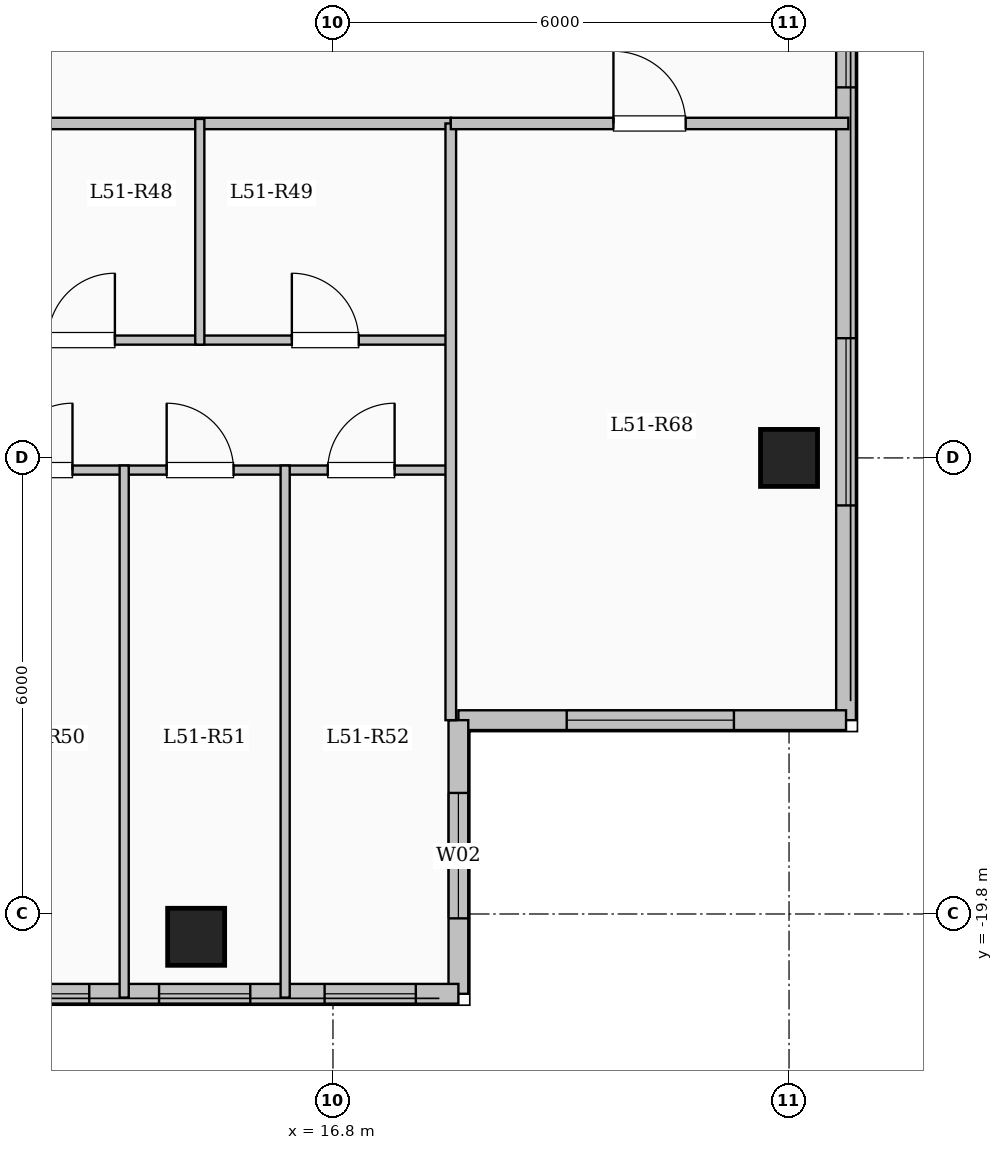
"""IFC4 building model, lengths in metres.
Left out: names, types, materials, properties, quantities, classifications, styles, units other than length and angle.
Written with IfcOpenShell. Run it as: python <this file> out.ifc"""

import sys

from ifc_helpers import new_model, si_unit, direction, frame, frame_2d, origin, origin_2d, place, context, subcontext, project, spatial, rectangle, extrude, element, fill, save


model = new_model("IFC4")
c1 = context("Model", 3, precision=1e-05, world=origin(), true_north=direction((0.0, 1.0)))
c2 = subcontext(c1, "Body", "Model", "MODEL_VIEW")
j1 = project(units=[si_unit("LENGTHUNIT", "METRE"), si_unit("PLANEANGLEUNIT", "RADIAN")], contexts=[c1])
p1 = place(None, origin())
s1 = spatial("IfcSite", under=j1, at=p1, CompositionType="ELEMENT")
p2 = place(p1, origin())
s2 = spatial("IfcBuilding", under=s1, at=p2, CompositionType="ELEMENT")
p3 = place(p2, frame((0.0, 0.0, 190.25)))
s3 = spatial("IfcBuildingStorey", under=s2, at=p3, CompositionType="ELEMENT", Elevation=190.25)
for number, where, z_axis, x_axis in (
    (1, (15.0, -20.1, 0.0), (0.0, 0.0, 1.0), (1.0, 0.0, 0.0)),
    (2, (22.8, -13.8, 0.0), (0.0, 0.0, 1.0), (1.0, 0.0, 0.0)),
):
    element("IfcColumn", number, at=place(p3, frame(where, z_axis=z_axis, x_axis=x_axis)), inside=s3, PredefinedType="COLUMN", context=c2, shape_type="SweptSolid", body=[
        extrude(rectangle(XDim=0.75, YDim=0.75, at=origin_2d()), origin(), (0.0, 0.0, 1.0), 3.35),
    ])
p4 = place(p3, frame((23.55, 17.25, 0.0), z_axis=(0.0, 0.0, 1.0), x_axis=(0.0, -1.0, 0.0)))
e3 = element("IfcWall", 3, at=p4, inside=s3, PredefinedType="SOLIDWALL", context=c2, shape_type="SweptSolid", body=[
    extrude(rectangle(XDim=34.5, YDim=0.26, at=frame_2d((17.25, 0.0))), origin(), (0.0, 0.0, 1.0), 3.1),
])
p5 = place(p4, frame((1.375, 0.0, 0.9)))
e4 = element("IfcOpeningElement", 4, at=p5, cuts=e3, PredefinedType="OPENING", context=c2, shape_type="SweptSolid", body=[
    extrude(rectangle(XDim=2.0, YDim=1.7, at=frame_2d((1.0, 0.85))), frame((0.0, 0.14, 0.0), z_axis=(0.0, -1.0, 0.0), x_axis=(1.0, 0.0, 0.0)), (0.0, 0.0, 1.0), 0.28),
])
p6 = place(p4, frame((5.125, 0.0, 0.95)))
e5 = element("IfcOpeningElement", 5, at=p6, cuts=e3, PredefinedType="OPENING", context=c2, shape_type="SweptSolid", body=[
    extrude(rectangle(XDim=1.0, YDim=1.5, at=frame_2d((0.5, 0.75))), frame((0.0, 0.14, 0.0), z_axis=(0.0, -1.0, 0.0), x_axis=(1.0, 0.0, 0.0)), (0.0, 0.0, 1.0), 0.28),
])
p7 = place(p4, frame((14.5, 0.0, 0.9)))
e6 = element("IfcOpeningElement", 6, at=p7, cuts=e3, PredefinedType="OPENING", context=c2, shape_type="SweptSolid", body=[
    extrude(rectangle(XDim=2.0, YDim=1.7, at=frame_2d((1.0, 0.85))), frame((0.0, 0.14, 0.0), z_axis=(0.0, -1.0, 0.0), x_axis=(1.0, 0.0, 0.0)), (0.0, 0.0, 1.0), 0.28),
])
p8 = place(p4, frame((24.975, 0.0, 0.95)))
e7 = element("IfcOpeningElement", 7, at=p8, cuts=e3, PredefinedType="OPENING", context=c2, shape_type="SweptSolid", body=[
    extrude(rectangle(XDim=1.2, YDim=1.5, at=frame_2d((0.6, 0.75))), frame((0.0, 0.14, 0.0), z_axis=(0.0, -1.0, 0.0), x_axis=(1.0, 0.0, 0.0)), (0.0, 0.0, 1.0), 0.28),
])
p9 = place(p4, frame((29.475, 0.0, 0.9)))
e8 = element("IfcOpeningElement", 8, at=p9, cuts=e3, PredefinedType="OPENING", context=c2, shape_type="SweptSolid", body=[
    extrude(rectangle(XDim=2.2, YDim=1.75, at=frame_2d((1.1, 0.875))), frame((0.0, 0.14, 0.0), z_axis=(0.0, -1.0, 0.0), x_axis=(1.0, 0.0, 0.0)), (0.0, 0.0, 1.0), 0.28),
])
p10 = place(p3, frame((23.55, -17.25, 0.0), z_axis=(0.0, 0.0, 1.0), x_axis=(-1.0, 0.0, 0.0)))
e9 = element("IfcWall", 9, at=p10, inside=s3, PredefinedType="SOLIDWALL", context=c2, shape_type="SweptSolid", body=[
    extrude(rectangle(XDim=5.1, YDim=0.26, at=frame_2d((2.55, 0.0))), origin(), (0.0, 0.0, 1.0), 3.1),
])
p11 = place(p10, frame((1.475, 0.0, 0.9)))
e10 = element("IfcOpeningElement", 10, at=p11, cuts=e9, PredefinedType="OPENING", context=c2, shape_type="SweptSolid", body=[
    extrude(rectangle(XDim=2.2, YDim=1.75, at=frame_2d((1.1, 0.875))), frame((0.0, 0.14, 0.0), z_axis=(0.0, -1.0, 0.0), x_axis=(1.0, 0.0, 0.0)), (0.0, 0.0, 1.0), 0.28),
])
p12 = place(p3, frame((18.45, -17.25, 0.0), z_axis=(0.0, 0.0, 1.0), x_axis=(0.0, -1.0, 0.0)))
e11 = element("IfcWall", 11, at=p12, inside=s3, PredefinedType="SOLIDWALL", context=c2, shape_type="SweptSolid", body=[
    extrude(rectangle(XDim=3.6, YDim=0.26, at=frame_2d((1.8, 0.0))), origin(), (0.0, 0.0, 1.0), 3.1),
])
p13 = place(p12, frame((0.958, 0.0, 0.9)))
e12 = element("IfcOpeningElement", 12, at=p13, cuts=e11, PredefinedType="OPENING", context=c2, shape_type="SweptSolid", body=[
    extrude(rectangle(XDim=1.65, YDim=1.6, at=frame_2d((0.825, 0.8))), frame((0.0, 0.14, 0.0), z_axis=(0.0, -1.0, 0.0), x_axis=(1.0, 0.0, 0.0)), (0.0, 0.0, 1.0), 0.28),
])
p14 = place(p3, frame((18.45, -20.85, 0.0), z_axis=(0.0, 0.0, 1.0), x_axis=(-1.0, 0.0, 0.0)))
e13 = element("IfcWall", 13, at=p14, inside=s3, PredefinedType="SOLIDWALL", context=c2, shape_type="SweptSolid", body=[
    extrude(rectangle(XDim=11.1, YDim=0.26, at=frame_2d((5.55, 0.0))), origin(), (0.0, 0.0, 1.0), 3.1),
])
p15 = place(p14, frame((0.56, 0.0, 0.95)))
e14 = element("IfcOpeningElement", 14, at=p15, cuts=e13, PredefinedType="OPENING", context=c2, shape_type="SweptSolid", body=[
    extrude(rectangle(XDim=1.2, YDim=1.5, at=frame_2d((0.6, 0.75))), frame((0.0, 0.14, 0.0), z_axis=(0.0, -1.0, 0.0), x_axis=(1.0, 0.0, 0.0)), (0.0, 0.0, 1.0), 0.28),
])
p16 = place(p14, frame((2.738, 0.0, 0.95)))
e15 = element("IfcOpeningElement", 15, at=p16, cuts=e13, PredefinedType="OPENING", context=c2, shape_type="SweptSolid", body=[
    extrude(rectangle(XDim=1.2, YDim=1.5, at=frame_2d((0.6, 0.75))), frame((0.0, 0.14, 0.0), z_axis=(0.0, -1.0, 0.0), x_axis=(1.0, 0.0, 0.0)), (0.0, 0.0, 1.0), 0.28),
])
p17 = place(p14, frame((4.856, 0.0, 0.95)))
e16 = element("IfcOpeningElement", 16, at=p17, cuts=e13, PredefinedType="OPENING", context=c2, shape_type="SweptSolid", body=[
    extrude(rectangle(XDim=1.2, YDim=1.5, at=frame_2d((0.6, 0.75))), frame((0.0, 0.14, 0.0), z_axis=(0.0, -1.0, 0.0), x_axis=(1.0, 0.0, 0.0)), (0.0, 0.0, 1.0), 0.28),
])
p18 = place(p14, frame((7.362, 0.0, 0.9)))
e17 = element("IfcOpeningElement", 17, at=p18, cuts=e13, PredefinedType="OPENING", context=c2, shape_type="SweptSolid", body=[
    extrude(rectangle(XDim=1.65, YDim=1.6, at=frame_2d((0.825, 0.8))), frame((0.0, 0.14, 0.0), z_axis=(0.0, -1.0, 0.0), x_axis=(1.0, 0.0, 0.0)), (0.0, 0.0, 1.0), 0.28),
])
p19 = place(p14, frame((10.103, 0.0, 0.95)))
e18 = element("IfcOpeningElement", 18, at=p19, cuts=e13, PredefinedType="OPENING", context=c2, shape_type="SweptSolid", body=[
    extrude(rectangle(XDim=0.85, YDim=1.5, at=frame_2d((0.425, 0.75))), frame((0.0, 0.14, 0.0), z_axis=(0.0, -1.0, 0.0), x_axis=(1.0, 0.0, 0.0)), (0.0, 0.0, 1.0), 0.28),
])
p20 = place(p3, frame((8.55, -9.4, 0.0), z_axis=(0.0, 0.0, 1.0), x_axis=(1.0, 0.0, 0.0)))
e19 = element("IfcWall", 19, at=p20, inside=s3, PredefinedType="PARTITIONING", context=c2, shape_type="SweptSolid", body=[
    extrude(rectangle(XDim=9.8, YDim=0.15, at=frame_2d((4.9, 0.0))), origin(), (0.0, 0.0, 1.0), 3.1),
])
p21 = place(p20, frame((0.9, 0.0, 0.0)))
e20 = element("IfcOpeningElement", 20, at=p21, cuts=e19, PredefinedType="OPENING", context=c2, shape_type="SweptSolid", body=[
    extrude(rectangle(XDim=0.96, YDim=2.15, at=frame_2d((0.48, 1.075))), frame((0.0, 0.085, 0.0), z_axis=(0.0, -1.0, 0.0), x_axis=(1.0, 0.0, 0.0)), (0.0, 0.0, 1.0), 0.17),
])
p22 = place(p3, frame((11.934, -12.25, 0.0), z_axis=(0.0, 0.0, 1.0), x_axis=(1.0, 0.0, 0.0)))
e21 = element("IfcWall", 21, at=p22, inside=s3, PredefinedType="PARTITIONING", context=c2, shape_type="SweptSolid", body=[
    extrude(rectangle(XDim=3.114, YDim=0.12, at=frame_2d((1.557, 0.0))), origin(), (0.0, 0.0, 1.0), 2.725),
])
p23 = place(p22, frame((1.117, 0.0, 0.0)))
e22 = element("IfcOpeningElement", 22, at=p23, cuts=e21, PredefinedType="OPENING", context=c2, shape_type="SweptSolid", body=[
    extrude(rectangle(XDim=0.88, YDim=2.1, at=frame_2d((0.44, 1.05))), frame((0.0, 0.07, 0.0), z_axis=(0.0, -1.0, 0.0), x_axis=(1.0, 0.0, 0.0)), (0.0, 0.0, 1.0), 0.14),
])
p24 = place(p3, frame((15.048, -12.25, 0.0), z_axis=(0.0, 0.0, 1.0), x_axis=(1.0, 0.0, 0.0)))
e23 = element("IfcWall", 23, at=p24, inside=s3, PredefinedType="PARTITIONING", context=c2, shape_type="SweptSolid", body=[
    extrude(rectangle(XDim=3.302, YDim=0.12, at=frame_2d((1.651, 0.0))), origin(), (0.0, 0.0, 1.0), 3.1),
])
p25 = place(p24, frame((1.211, 0.0, 0.0)))
e24 = element("IfcOpeningElement", 24, at=p25, cuts=e23, PredefinedType="OPENING", context=c2, shape_type="SweptSolid", body=[
    extrude(rectangle(XDim=0.88, YDim=2.1, at=frame_2d((0.44, 1.05))), frame((0.0, 0.07, 0.0), z_axis=(0.0, -1.0, 0.0), x_axis=(1.0, 0.0, 0.0)), (0.0, 0.0, 1.0), 0.14),
])
p26 = place(p3, frame((11.874, -13.96, 0.0), z_axis=(0.0, 0.0, 1.0), x_axis=(1.0, 0.0, 0.0)))
e25 = element("IfcWall", 25, at=p26, inside=s3, PredefinedType="PARTITIONING", context=c2, shape_type="SweptSolid", body=[
    extrude(rectangle(XDim=6.536, YDim=0.12, at=frame_2d((3.268, 0.0))), origin(), (0.0, 0.0, 1.0), 2.725),
])
p27 = place(p26, frame((0.619, 0.0, 0.0)))
e26 = element("IfcOpeningElement", 26, at=p27, cuts=e25, PredefinedType="OPENING", context=c2, shape_type="SweptSolid", body=[
    extrude(rectangle(XDim=0.88, YDim=2.1, at=frame_2d((0.44, 1.05))), frame((0.0, 0.07, 0.0), z_axis=(0.0, -1.0, 0.0), x_axis=(1.0, 0.0, 0.0)), (0.0, 0.0, 1.0), 0.14),
])
p28 = place(p26, frame((2.738, 0.0, 0.0)))
e27 = element("IfcOpeningElement", 27, at=p28, cuts=e25, PredefinedType="OPENING", context=c2, shape_type="SweptSolid", body=[
    extrude(rectangle(XDim=0.88, YDim=2.1, at=frame_2d((0.44, 1.05))), frame((0.0, 0.07, 0.0), z_axis=(0.0, -1.0, 0.0), x_axis=(1.0, 0.0, 0.0)), (0.0, 0.0, 1.0), 0.14),
])
p29 = place(p26, frame((4.857, 0.0, 0.0)))
e28 = element("IfcOpeningElement", 28, at=p29, cuts=e25, PredefinedType="OPENING", context=c2, shape_type="SweptSolid", body=[
    extrude(rectangle(XDim=0.88, YDim=2.1, at=frame_2d((0.44, 1.05))), frame((0.0, 0.07, 0.0), z_axis=(0.0, -1.0, 0.0), x_axis=(1.0, 0.0, 0.0)), (0.0, 0.0, 1.0), 0.14),
])
p30 = place(p3, frame((15.048, -12.31, 0.0), z_axis=(0.0, 0.0, 1.0), x_axis=(0.0, 1.0, 0.0)))
e29 = element("IfcWall", 29, at=p30, inside=s3, PredefinedType="PARTITIONING", context=c2, shape_type="SweptSolid", body=[
    extrude(rectangle(XDim=2.97, YDim=0.12, at=frame_2d((1.485, 0.0))), origin(), (0.0, 0.0, 1.0), 2.585),
])
for number, where, z_axis, x_axis in (
    (30, (14.053, -20.9, 0.0), (0.0, 0.0, 1.0), (0.0, 1.0, 0.0)),
    (31, (16.171, -20.9, 0.0), (0.0, 0.0, 1.0), (0.0, 1.0, 0.0)),
):
    element("IfcWall", number, at=place(p3, frame(where, z_axis=z_axis, x_axis=x_axis)), inside=s3, PredefinedType="PARTITIONING", context=c2, shape_type="SweptSolid", body=[
        extrude(rectangle(XDim=7.0, YDim=0.12, at=frame_2d((3.5, 0.0))), origin(), (0.0, 0.0, 1.0), 3.1),
    ])
p31 = place(p3, frame((18.35, -17.25, 0.0), z_axis=(0.0, 0.0, 1.0), x_axis=(0.0, 1.0, 0.0)))
e32 = element("IfcWall", 32, at=p31, inside=s3, PredefinedType="PARTITIONING", context=c2, shape_type="SweptSolid", body=[
    extrude(rectangle(XDim=7.85, YDim=0.14, at=frame_2d((3.925, 0.0))), origin(), (0.0, 0.0, 1.0), 3.1),
])
p32 = place(p3, frame((18.35, -9.4, 0.0), z_axis=(0.0, 0.0, 1.0), x_axis=(1.0, 0.0, 0.0)))
e33 = element("IfcWall", 33, at=p32, inside=s3, PredefinedType="PARTITIONING", context=c2, shape_type="SweptSolid", body=[
    extrude(rectangle(XDim=5.23, YDim=0.15, at=frame_2d((2.615, 0.0))), origin(), (0.0, 0.0, 1.0), 3.1),
])
p33 = place(p32, frame((2.14, 0.0, 0.0)))
e34 = element("IfcOpeningElement", 34, at=p33, cuts=e33, PredefinedType="OPENING", context=c2, shape_type="SweptSolid", body=[
    extrude(rectangle(XDim=0.95, YDim=2.15, at=frame_2d((0.475, 1.075))), frame((0.0, 0.085, 0.0), z_axis=(0.0, -1.0, 0.0), x_axis=(1.0, 0.0, 0.0)), (0.0, 0.0, 1.0), 0.17),
])
p34 = place(p8, origin())
e35 = element("IfcWindow", 35, at=p34, inside=s3, PartitioningType="SINGLE_PANEL", PredefinedType="WINDOW", context=c2, shape_type="SweptSolid", body=[
    extrude(rectangle(XDim=1.2, YDim=1.5, at=frame_2d((0.6, 0.75))), frame((0.0, 0.03, 0.0), z_axis=(0.0, -1.0, 0.0), x_axis=(1.0, 0.0, 0.0)), (0.0, 0.0, 1.0), 0.06),
])
fill(e7, e35)
p35 = place(p9, origin())
e36 = element("IfcWindow", 36, at=p35, inside=s3, PartitioningType="SINGLE_PANEL", PredefinedType="WINDOW", context=c2, shape_type="SweptSolid", body=[
    extrude(rectangle(XDim=2.2, YDim=1.75, at=frame_2d((1.1, 0.875))), frame((0.0, 0.03, 0.0), z_axis=(0.0, -1.0, 0.0), x_axis=(1.0, 0.0, 0.0)), (0.0, 0.0, 1.0), 0.06),
])
fill(e8, e36)
p36 = place(p11, origin())
e37 = element("IfcWindow", 37, at=p36, inside=s3, PartitioningType="SINGLE_PANEL", PredefinedType="WINDOW", context=c2, shape_type="SweptSolid", body=[
    extrude(rectangle(XDim=2.2, YDim=1.75, at=frame_2d((1.1, 0.875))), frame((0.0, 0.03, 0.0), z_axis=(0.0, -1.0, 0.0), x_axis=(1.0, 0.0, 0.0)), (0.0, 0.0, 1.0), 0.06),
])
fill(e10, e37)
p37 = place(p13, origin())
e38 = element("IfcWindow", 38, at=p37, inside=s3, PartitioningType="SINGLE_PANEL", PredefinedType="WINDOW", context=c2, shape_type="SweptSolid", body=[
    extrude(rectangle(XDim=1.65, YDim=1.6, at=frame_2d((0.825, 0.8))), frame((0.0, 0.03, 0.0), z_axis=(0.0, -1.0, 0.0), x_axis=(1.0, 0.0, 0.0)), (0.0, 0.0, 1.0), 0.06),
])
fill(e12, e38)
p38 = place(p15, origin())
e39 = element("IfcWindow", 39, at=p38, inside=s3, PartitioningType="SINGLE_PANEL", PredefinedType="WINDOW", context=c2, shape_type="SweptSolid", body=[
    extrude(rectangle(XDim=1.2, YDim=1.5, at=frame_2d((0.6, 0.75))), frame((0.0, 0.03, 0.0), z_axis=(0.0, -1.0, 0.0), x_axis=(1.0, 0.0, 0.0)), (0.0, 0.0, 1.0), 0.06),
])
fill(e14, e39)
p39 = place(p16, origin())
e40 = element("IfcWindow", 40, at=p39, inside=s3, PartitioningType="SINGLE_PANEL", PredefinedType="WINDOW", context=c2, shape_type="SweptSolid", body=[
    extrude(rectangle(XDim=1.2, YDim=1.5, at=frame_2d((0.6, 0.75))), frame((0.0, 0.03, 0.0), z_axis=(0.0, -1.0, 0.0), x_axis=(1.0, 0.0, 0.0)), (0.0, 0.0, 1.0), 0.06),
])
fill(e15, e40)
p40 = place(p17, origin())
e41 = element("IfcWindow", 41, at=p40, inside=s3, PartitioningType="SINGLE_PANEL", PredefinedType="WINDOW", context=c2, shape_type="SweptSolid", body=[
    extrude(rectangle(XDim=1.2, YDim=1.5, at=frame_2d((0.6, 0.75))), frame((0.0, 0.03, 0.0), z_axis=(0.0, -1.0, 0.0), x_axis=(1.0, 0.0, 0.0)), (0.0, 0.0, 1.0), 0.06),
])
fill(e16, e41)
p41 = place(p23, origin())
e42 = element("IfcDoor", 42, at=p41, inside=s3, OperationType="SINGLE_SWING_RIGHT", PredefinedType="DOOR", context=c2, shape_type="SweptSolid", body=[
    extrude(rectangle(XDim=0.88, YDim=2.1, at=frame_2d((0.44, 1.05))), frame((0.0, 0.025, 0.0), z_axis=(0.0, -1.0, 0.0), x_axis=(1.0, 0.0, 0.0)), (0.0, 0.0, 1.0), 0.05),
])
fill(e22, e42)
p42 = place(p25, origin())
e43 = element("IfcDoor", 43, at=p42, inside=s3, OperationType="SINGLE_SWING_LEFT", PredefinedType="DOOR", context=c2, shape_type="SweptSolid", body=[
    extrude(rectangle(XDim=0.88, YDim=2.1, at=frame_2d((0.44, 1.05))), frame((0.0, 0.025, 0.0), z_axis=(0.0, -1.0, 0.0), x_axis=(1.0, 0.0, 0.0)), (0.0, 0.0, 1.0), 0.05),
])
fill(e24, e43)
p43 = place(p27, origin())
e44 = element("IfcDoor", 44, at=p43, inside=s3, OperationType="SINGLE_SWING_RIGHT", PredefinedType="DOOR", context=c2, shape_type="SweptSolid", body=[
    extrude(rectangle(XDim=0.88, YDim=2.1, at=frame_2d((0.44, 1.05))), frame((0.0, 0.025, 0.0), z_axis=(0.0, -1.0, 0.0), x_axis=(1.0, 0.0, 0.0)), (0.0, 0.0, 1.0), 0.05),
])
fill(e26, e44)
p44 = place(p28, origin())
e45 = element("IfcDoor", 45, at=p44, inside=s3, OperationType="SINGLE_SWING_LEFT", PredefinedType="DOOR", context=c2, shape_type="SweptSolid", body=[
    extrude(rectangle(XDim=0.88, YDim=2.1, at=frame_2d((0.44, 1.05))), frame((0.0, 0.025, 0.0), z_axis=(0.0, -1.0, 0.0), x_axis=(1.0, 0.0, 0.0)), (0.0, 0.0, 1.0), 0.05),
])
fill(e27, e45)
p45 = place(p29, origin())
e46 = element("IfcDoor", 46, at=p45, inside=s3, OperationType="SINGLE_SWING_RIGHT", PredefinedType="DOOR", context=c2, shape_type="SweptSolid", body=[
    extrude(rectangle(XDim=0.88, YDim=2.1, at=frame_2d((0.44, 1.05))), frame((0.0, 0.025, 0.0), z_axis=(0.0, -1.0, 0.0), x_axis=(1.0, 0.0, 0.0)), (0.0, 0.0, 1.0), 0.05),
])
fill(e28, e46)
p46 = place(p33, origin())
e47 = element("IfcDoor", 47, at=p46, inside=s3, OperationType="SINGLE_SWING_LEFT", PredefinedType="DOOR", context=c2, shape_type="SweptSolid", body=[
    extrude(rectangle(XDim=0.95, YDim=2.15, at=frame_2d((0.475, 1.075))), frame((0.0, 0.025, 0.0), z_axis=(0.0, -1.0, 0.0), x_axis=(1.0, 0.0, 0.0)), (0.0, 0.0, 1.0), 0.05),
])
fill(e34, e47)
save(model, sys.argv[1])
